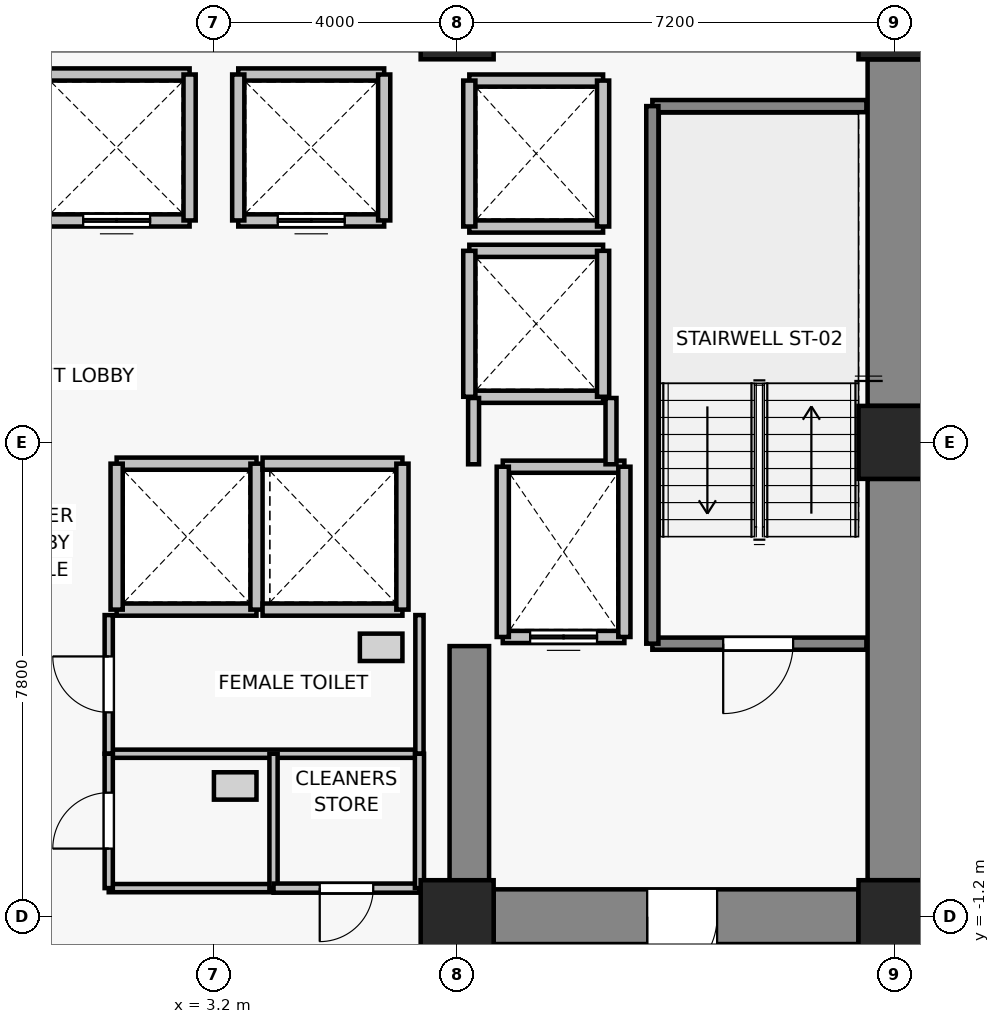
"""IFC4 building model, lengths in metres.
Left out: names, types, materials, properties, quantities, classifications, styles, units other than length and angle.
Written with IfcOpenShell. Run it as: python <this file> out.ifc"""

import sys

from ifc_helpers import new_model, si_unit, direction, frame, frame_2d, origin, origin_2d, place, context, subcontext, project, spatial, rectangle, extrude, source, transform, mapped, element, fill, save


model = new_model("IFC4")
c1 = context("Model", 3, precision=1e-05, world=origin(), true_north=direction((0.0, 1.0)))
c2 = subcontext(c1, "Body", "Model", "MODEL_VIEW")
j1 = project(units=[si_unit("LENGTHUNIT", "METRE"), si_unit("PLANEANGLEUNIT", "RADIAN")], contexts=[c1])
p1 = place(None, origin())
s1 = spatial("IfcSite", under=j1, at=p1, CompositionType="ELEMENT")
p2 = place(p1, origin())
s2 = spatial("IfcBuilding", under=s1, at=p2, CompositionType="ELEMENT")
p3 = place(p2, frame((0.0, 0.0, 53.8)))
s3 = spatial("IfcBuildingStorey", under=s2, at=p3, CompositionType="ELEMENT", Elevation=53.8)
for number, where, z_axis, x_axis in (
    (1, (7.2, -1.2, 0.0), (0.0, 0.0, 1.0), (1.0, 0.0, 0.0)),
    (2, (14.4, -1.2, 0.0), (0.0, 0.0, 1.0), (1.0, 0.0, 0.0)),
    (3, (14.4, 6.6, 0.0), (0.0, 0.0, 1.0), (1.0, 0.0, 0.0)),
    (4, (7.2, 13.5, 0.0), (0.0, 0.0, 1.0), (1.0, 0.0, 0.0)),
    (5, (14.4, 13.5, 0.0), (0.0, 0.0, 1.0), (1.0, 0.0, 0.0)),
):
    element("IfcColumn", number, at=place(p3, frame(where, z_axis=z_axis, x_axis=x_axis)), inside=s3, PredefinedType="COLUMN", context=c2, shape_type="SweptSolid", body=[
        extrude(rectangle(XDim=1.2, YDim=1.2, at=origin_2d()), origin(), (0.0, 0.0, 1.0), 3.3),
    ])
p4 = place(p3, frame((14.4, -0.6, 0.0), z_axis=(0.0, 0.0, 1.0), x_axis=(0.0, 1.0, 0.0)))
e6 = element("IfcWall", 6, at=p4, inside=s3, PredefinedType="SHEAR", context=c2, shape_type="SweptSolid", body=[
    extrude(rectangle(XDim=6.6, YDim=0.9, at=frame_2d((3.3, 0.0))), origin(), (0.0, 0.0, 1.0), 3.075),
])
p5 = place(p3, frame((14.4, 7.2, 0.0), z_axis=(0.0, 0.0, 1.0), x_axis=(0.0, 1.0, 0.0)))
e7 = element("IfcWall", 7, at=p5, inside=s3, PredefinedType="SHEAR", context=c2, shape_type="SweptSolid", body=[
    extrude(rectangle(XDim=5.7, YDim=0.9, at=frame_2d((2.85, 0.0))), origin(), (0.0, 0.0, 1.0), 3.075),
])
p6 = place(p3, frame((13.8, -1.2, 0.0), z_axis=(0.0, 0.0, 1.0), x_axis=(-1.0, 0.0, 0.0)))
e8 = element("IfcWall", 8, at=p6, inside=s3, PredefinedType="SHEAR", context=c2, shape_type="SweptSolid", body=[
    extrude(rectangle(XDim=6.0, YDim=0.9, at=frame_2d((3.0, 0.0))), origin(), (0.0, 0.0, 1.0), 3.075),
])
p7 = place(p6, frame((2.325, 0.0, 0.0)))
e9 = element("IfcOpeningElement", 9, at=p7, cuts=e8, PredefinedType="OPENING", context=c2, shape_type="SweptSolid", body=[
    extrude(rectangle(XDim=1.15, YDim=2.15, at=frame_2d((0.575, 1.075))), frame((0.0, 0.46, 0.0), z_axis=(0.0, -1.0, 0.0), x_axis=(1.0, 0.0, 0.0)), (0.0, 0.0, 1.0), 0.92),
])
p8 = place(p3, frame((7.4, -0.75, 0.0), z_axis=(0.0, 0.0, 1.0), x_axis=(0.0, 1.0, 0.0)))
e10 = element("IfcWall", 10, at=p8, inside=s3, PredefinedType="SHEAR", context=c2, shape_type="SweptSolid", body=[
    extrude(rectangle(XDim=4.0, YDim=0.65, at=frame_2d((2.0, 0.0))), origin(), (0.0, 0.0, 1.0), 3.075),
])
p9 = place(p3, frame((9.95, 3.4, 0.0), z_axis=(0.0, 0.0, 1.0), x_axis=(-1.0, 0.0, 0.0)))
e11 = element("IfcWall", 11, at=p9, inside=s3, PredefinedType="SOLIDWALL", context=c2, shape_type="SweptSolid", body=[
    extrude(rectangle(XDim=2.0, YDim=0.2, at=frame_2d((1.0, 0.0))), origin(), (0.0, 0.0, 1.0), 3.075),
])
p10 = place(p9, frame((0.45, 0.0, 0.0)))
e12 = element("IfcOpeningElement", 12, at=p10, cuts=e11, PredefinedType="OPENING", context=c2, shape_type="SweptSolid", body=[
    extrude(rectangle(XDim=1.1, YDim=2.2, at=frame_2d((0.55, 1.1))), frame((0.0, 0.11, 0.0), z_axis=(0.0, -1.0, 0.0), x_axis=(1.0, 0.0, 0.0)), (0.0, 0.0, 1.0), 0.22),
])
p11 = place(p3, frame((7.95, 6.2, 0.0), z_axis=(0.0, 0.0, 1.0), x_axis=(1.0, 0.0, 0.0)))
e13 = element("IfcWall", 13, at=p11, inside=s3, PredefinedType="SOLIDWALL", context=c2, shape_type="SweptSolid", body=[
    extrude(rectangle(XDim=2.0, YDim=0.2, at=frame_2d((1.0, 0.0))), origin(), (0.0, 0.0, 1.0), 3.075),
])
for number, where, z_axis, x_axis in (
    (14, (7.95, 3.4, 0.0), (0.0, 0.0, 1.0), (0.0, 1.0, 0.0)),
    (15, (9.95, 6.2, 0.0), (0.0, 0.0, 1.0), (0.0, -1.0, 0.0)),
):
    element("IfcWall", number, at=place(p3, frame(where, z_axis=z_axis, x_axis=x_axis)), inside=s3, PredefinedType="SOLIDWALL", context=c2, shape_type="SweptSolid", body=[
        extrude(rectangle(XDim=2.8, YDim=0.2, at=frame_2d((1.4, 0.0))), origin(), (0.0, 0.0, 1.0), 3.075),
    ])
p12 = place(p3, frame((2.8, 10.25, 0.0), z_axis=(0.0, 0.0, 1.0), x_axis=(-1.0, 0.0, 0.0)))
e16 = element("IfcWall", 16, at=p12, inside=s3, PredefinedType="SOLIDWALL", context=c2, shape_type="SweptSolid", body=[
    extrude(rectangle(XDim=2.4, YDim=0.2, at=frame_2d((1.2, 0.0))), origin(), (0.0, 0.0, 1.0), 3.075),
])
p13 = place(p12, frame((0.65, 0.0, 0.0)))
e17 = element("IfcOpeningElement", 17, at=p13, cuts=e16, PredefinedType="OPENING", context=c2, shape_type="SweptSolid", body=[
    extrude(rectangle(XDim=1.1, YDim=2.2, at=frame_2d((0.55, 1.1))), frame((0.0, 0.11, 0.0), z_axis=(0.0, -1.0, 0.0), x_axis=(1.0, 0.0, 0.0)), (0.0, 0.0, 1.0), 0.22),
])
p14 = place(p3, frame((0.4, 12.65, 0.0), z_axis=(0.0, 0.0, 1.0), x_axis=(1.0, 0.0, 0.0)))
e18 = element("IfcWall", 18, at=p14, inside=s3, PredefinedType="SOLIDWALL", context=c2, shape_type="SweptSolid", body=[
    extrude(rectangle(XDim=2.4, YDim=0.2, at=frame_2d((1.2, 0.0))), origin(), (0.0, 0.0, 1.0), 3.075),
])
p15 = place(p3, frame((2.8, 12.65, 0.0), z_axis=(0.0, 0.0, 1.0), x_axis=(0.0, -1.0, 0.0)))
e19 = element("IfcWall", 19, at=p15, inside=s3, PredefinedType="SOLIDWALL", context=c2, shape_type="SweptSolid", body=[
    extrude(rectangle(XDim=2.4, YDim=0.2, at=frame_2d((1.2, 0.0))), origin(), (0.0, 0.0, 1.0), 3.075),
])
p16 = place(p3, frame((6.0, 10.25, 0.0), z_axis=(0.0, 0.0, 1.0), x_axis=(-1.0, 0.0, 0.0)))
e20 = element("IfcWall", 20, at=p16, inside=s3, PredefinedType="SOLIDWALL", context=c2, shape_type="SweptSolid", body=[
    extrude(rectangle(XDim=2.4, YDim=0.2, at=frame_2d((1.2, 0.0))), origin(), (0.0, 0.0, 1.0), 3.075),
])
p17 = place(p16, frame((0.65, 0.0, 0.0)))
e21 = element("IfcOpeningElement", 21, at=p17, cuts=e20, PredefinedType="OPENING", context=c2, shape_type="SweptSolid", body=[
    extrude(rectangle(XDim=1.1, YDim=2.2, at=frame_2d((0.55, 1.1))), frame((0.0, 0.11, 0.0), z_axis=(0.0, -1.0, 0.0), x_axis=(1.0, 0.0, 0.0)), (0.0, 0.0, 1.0), 0.22),
])
for number, where, z_axis, x_axis in (
    (22, (3.6, 12.65, 0.0), (0.0, 0.0, 1.0), (1.0, 0.0, 0.0)),
    (23, (3.6, 10.25, 0.0), (0.0, 0.0, 1.0), (0.0, 1.0, 0.0)),
    (24, (6.0, 12.65, 0.0), (0.0, 0.0, 1.0), (0.0, -1.0, 0.0)),
):
    element("IfcWall", number, at=place(p3, frame(where, z_axis=z_axis, x_axis=x_axis)), inside=s3, PredefinedType="SOLIDWALL", context=c2, shape_type="SweptSolid", body=[
        extrude(rectangle(XDim=2.4, YDim=0.2, at=frame_2d((1.2, 0.0))), origin(), (0.0, 0.0, 1.0), 3.075),
    ])
for number, where, z_axis, x_axis in (
    (25, (3.9, 3.85, 0.0), (0.0, 0.0, 1.0), (-1.0, 0.0, 0.0)),
    (26, (1.6, 6.25, 0.0), (0.0, 0.0, 1.0), (1.0, 0.0, 0.0)),
):
    element("IfcWall", number, at=place(p3, frame(where, z_axis=z_axis, x_axis=x_axis)), inside=s3, PredefinedType="SOLIDWALL", context=c2, shape_type="SweptSolid", body=[
        extrude(rectangle(XDim=2.3, YDim=0.2, at=frame_2d((1.15, 0.0))), origin(), (0.0, 0.0, 1.0), 3.075),
    ])
for number, where, z_axis, x_axis in (
    (27, (1.6, 3.85, 0.0), (0.0, 0.0, 1.0), (0.0, 1.0, 0.0)),
    (28, (3.9, 6.25, 0.0), (0.0, 0.0, 1.0), (0.0, -1.0, 0.0)),
):
    element("IfcWall", number, at=place(p3, frame(where, z_axis=z_axis, x_axis=x_axis)), inside=s3, PredefinedType="SOLIDWALL", context=c2, shape_type="SweptSolid", body=[
        extrude(rectangle(XDim=2.4, YDim=0.2, at=frame_2d((1.2, 0.0))), origin(), (0.0, 0.0, 1.0), 3.075),
    ])
for number, where, z_axis, x_axis in (
    (29, (6.3, 3.85, 0.0), (0.0, 0.0, 1.0), (-1.0, 0.0, 0.0)),
    (30, (4.0, 6.25, 0.0), (0.0, 0.0, 1.0), (1.0, 0.0, 0.0)),
):
    element("IfcWall", number, at=place(p3, frame(where, z_axis=z_axis, x_axis=x_axis)), inside=s3, PredefinedType="SOLIDWALL", context=c2, shape_type="SweptSolid", body=[
        extrude(rectangle(XDim=2.3, YDim=0.2, at=frame_2d((1.15, 0.0))), origin(), (0.0, 0.0, 1.0), 3.075),
    ])
p18 = place(p3, frame((6.3, 6.25, 0.0), z_axis=(0.0, 0.0, 1.0), x_axis=(0.0, -1.0, 0.0)))
e31 = element("IfcWall", 31, at=p18, inside=s3, PredefinedType="SOLIDWALL", context=c2, shape_type="SweptSolid", body=[
    extrude(rectangle(XDim=2.4, YDim=0.2, at=frame_2d((1.2, 0.0))), origin(), (0.0, 0.0, 1.0), 3.075),
])
for number, where, z_axis, x_axis in (
    (32, (9.6, 7.35, 0.0), (0.0, 0.0, 1.0), (-1.0, 0.0, 0.0)),
    (33, (7.4, 9.75, 0.0), (0.0, 0.0, 1.0), (1.0, 0.0, 0.0)),
):
    element("IfcWall", number, at=place(p3, frame(where, z_axis=z_axis, x_axis=x_axis)), inside=s3, PredefinedType="SOLIDWALL", context=c2, shape_type="SweptSolid", body=[
        extrude(rectangle(XDim=2.2, YDim=0.2, at=frame_2d((1.1, 0.0))), origin(), (0.0, 0.0, 1.0), 2.465),
    ])
p19 = place(p3, frame((7.4, 7.35, 0.0), z_axis=(0.0, 0.0, 1.0), x_axis=(0.0, 1.0, 0.0)))
e34 = element("IfcWall", 34, at=p19, inside=s3, PredefinedType="SOLIDWALL", context=c2, shape_type="SweptSolid", body=[
    extrude(rectangle(XDim=2.4, YDim=0.2, at=frame_2d((1.2, 0.0))), origin(), (0.0, 0.0, 1.0), 2.465),
])
p20 = place(p3, frame((9.6, 9.75, 0.0), z_axis=(0.0, 0.0, 1.0), x_axis=(0.0, -1.0, 0.0)))
e35 = element("IfcWall", 35, at=p20, inside=s3, PredefinedType="SOLIDWALL", context=c2, shape_type="SweptSolid", body=[
    extrude(rectangle(XDim=2.4, YDim=0.2, at=frame_2d((1.2, 0.0))), origin(), (0.0, 0.0, 1.0), 3.075),
])
for number, where, z_axis, x_axis in (
    (36, (9.6, 10.15, 0.0), (0.0, 0.0, 1.0), (-1.0, 0.0, 0.0)),
    (37, (7.4, 12.55, 0.0), (0.0, 0.0, 1.0), (1.0, 0.0, 0.0)),
):
    element("IfcWall", number, at=place(p3, frame(where, z_axis=z_axis, x_axis=x_axis)), inside=s3, PredefinedType="SOLIDWALL", context=c2, shape_type="SweptSolid", body=[
        extrude(rectangle(XDim=2.2, YDim=0.2, at=frame_2d((1.1, 0.0))), origin(), (0.0, 0.0, 1.0), 2.465),
    ])
p21 = place(p3, frame((7.4, 10.15, 0.0), z_axis=(0.0, 0.0, 1.0), x_axis=(0.0, 1.0, 0.0)))
e38 = element("IfcWall", 38, at=p21, inside=s3, PredefinedType="SOLIDWALL", context=c2, shape_type="SweptSolid", body=[
    extrude(rectangle(XDim=2.4, YDim=0.2, at=frame_2d((1.2, 0.0))), origin(), (0.0, 0.0, 1.0), 2.465),
])
p22 = place(p3, frame((9.6, 12.55, 0.0), z_axis=(0.0, 0.0, 1.0), x_axis=(0.0, -1.0, 0.0)))
e39 = element("IfcWall", 39, at=p22, inside=s3, PredefinedType="SOLIDWALL", context=c2, shape_type="SweptSolid", body=[
    extrude(rectangle(XDim=2.4, YDim=0.2, at=frame_2d((1.2, 0.0))), origin(), (0.0, 0.0, 1.0), 3.075),
])
p23 = place(p3, frame((13.93, 3.29, 0.0), z_axis=(0.0, 0.0, 1.0), x_axis=(-1.0, 0.0, 0.0)))
e40 = element("IfcWall", 40, at=p23, inside=s3, PredefinedType="SOLIDWALL", context=c2, shape_type="SweptSolid", body=[
    extrude(rectangle(XDim=3.52, YDim=0.2, at=frame_2d((1.76, 0.0))), origin(), (0.0, 0.0, 1.0), 3.075),
])
p24 = place(p23, frame((1.205, 0.0, 0.0)))
e41 = element("IfcOpeningElement", 41, at=p24, cuts=e40, PredefinedType="OPENING", context=c2, shape_type="SweptSolid", body=[
    extrude(rectangle(XDim=1.15, YDim=2.15, at=frame_2d((0.575, 1.075))), frame((0.0, 0.11, 0.0), z_axis=(0.0, -1.0, 0.0), x_axis=(1.0, 0.0, 0.0)), (0.0, 0.0, 1.0), 0.22),
])
p25 = place(p3, frame((10.41, 12.13, 0.0), z_axis=(0.0, 0.0, 1.0), x_axis=(1.0, 0.0, 0.0)))
e42 = element("IfcWall", 42, at=p25, inside=s3, PredefinedType="SOLIDWALL", context=c2, shape_type="SweptSolid", body=[
    extrude(rectangle(XDim=3.52, YDim=0.2, at=frame_2d((1.76, 0.0))), origin(), (0.0, 0.0, 1.0), 3.075),
])
p26 = place(p3, frame((10.41, 3.29, 0.0), z_axis=(0.0, 0.0, 1.0), x_axis=(0.0, 1.0, 0.0)))
e43 = element("IfcWall", 43, at=p26, inside=s3, PredefinedType="SOLIDWALL", context=c2, shape_type="SweptSolid", body=[
    extrude(rectangle(XDim=8.84, YDim=0.2, at=frame_2d((4.42, 0.0))), origin(), (0.0, 0.0, 1.0), 3.075),
])
p27 = place(p3, frame((7.47, 6.24, 0.0), z_axis=(0.0, 0.0, 1.0), x_axis=(0.0, 1.0, 0.0)))
e44 = element("IfcWall", 44, at=p27, inside=s3, PredefinedType="PARTITIONING", context=c2, shape_type="SweptSolid", body=[
    extrude(rectangle(XDim=1.09, YDim=0.18, at=frame_2d((0.545, 0.0))), origin(), (0.0, 0.0, 1.0), 2.465),
])
p28 = place(p3, frame((9.73, 7.33, 0.0), z_axis=(0.0, 0.0, 1.0), x_axis=(0.0, -1.0, 0.0)))
e45 = element("IfcWall", 45, at=p28, inside=s3, PredefinedType="PARTITIONING", context=c2, shape_type="SweptSolid", body=[
    extrude(rectangle(XDim=1.09, YDim=0.18, at=frame_2d((0.545, 0.0))), origin(), (0.0, 0.0, 1.0), 3.075),
])
p29 = place(p3, frame((6.58, 1.48, 0.0), z_axis=(0.0, 0.0, 1.0), x_axis=(-1.0, 0.0, 0.0)))
e46 = element("IfcWall", 46, at=p29, inside=s3, PredefinedType="PARTITIONING", context=c2, shape_type="SweptSolid", body=[
    extrude(rectangle(XDim=5.11, YDim=0.135, at=frame_2d((2.555, 0.0))), origin(), (0.0, 0.0, 1.0), 3.075),
])
p30 = place(p3, frame((1.47, 1.48, 0.0), z_axis=(0.0, 0.0, 1.0), x_axis=(0.0, 1.0, 0.0)))
e47 = element("IfcWall", 47, at=p30, inside=s3, PredefinedType="PARTITIONING", context=c2, shape_type="SweptSolid", body=[
    extrude(rectangle(XDim=2.28, YDim=0.135, at=frame_2d((1.14, 0.0))), origin(), (0.0, 0.0, 1.0), 3.075),
])
p31 = place(p30, frame((0.68, 0.0, 0.0)))
e48 = element("IfcOpeningElement", 48, at=p31, cuts=e47, PredefinedType="OPENING", context=c2, shape_type="SweptSolid", body=[
    extrude(rectangle(XDim=0.92, YDim=2.1, at=frame_2d((0.46, 1.05))), frame((0.0, 0.077, 0.0), z_axis=(0.0, -1.0, 0.0), x_axis=(1.0, 0.0, 0.0)), (0.0, 0.0, 1.0), 0.155),
])
p32 = place(p3, frame((6.58, 3.76, 0.0), z_axis=(0.0, 0.0, 1.0), x_axis=(0.0, -1.0, 0.0)))
e49 = element("IfcWall", 49, at=p32, inside=s3, PredefinedType="PARTITIONING", context=c2, shape_type="SweptSolid", body=[
    extrude(rectangle(XDim=2.28, YDim=0.135, at=frame_2d((1.14, 0.0))), origin(), (0.0, 0.0, 1.0), 3.075),
])
p33 = place(p3, frame((4.18, -0.73, 0.0), z_axis=(0.0, 0.0, 1.0), x_axis=(-1.0, 0.0, 0.0)))
e50 = element("IfcWall", 50, at=p33, inside=s3, PredefinedType="PARTITIONING", context=c2, shape_type="SweptSolid", body=[
    extrude(rectangle(XDim=2.71, YDim=0.135, at=frame_2d((1.355, 0.0))), origin(), (0.0, 0.0, 1.0), 3.075),
])
p34 = place(p3, frame((1.47, -0.73, 0.0), z_axis=(0.0, 0.0, 1.0), x_axis=(0.0, 1.0, 0.0)))
e51 = element("IfcWall", 51, at=p34, inside=s3, PredefinedType="PARTITIONING", context=c2, shape_type="SweptSolid", body=[
    extrude(rectangle(XDim=2.21, YDim=0.135, at=frame_2d((1.105, 0.0))), origin(), (0.0, 0.0, 1.0), 3.075),
])
p35 = place(p34, frame((0.65, 0.0, 0.0)))
e52 = element("IfcOpeningElement", 52, at=p35, cuts=e51, PredefinedType="OPENING", context=c2, shape_type="SweptSolid", body=[
    extrude(rectangle(XDim=0.92, YDim=2.1, at=frame_2d((0.46, 1.05))), frame((0.0, 0.077, 0.0), z_axis=(0.0, -1.0, 0.0), x_axis=(1.0, 0.0, 0.0)), (0.0, 0.0, 1.0), 0.155),
])
p36 = place(p3, frame((4.18, 1.48, 0.0), z_axis=(0.0, 0.0, 1.0), x_axis=(0.0, -1.0, 0.0)))
e53 = element("IfcWall", 53, at=p36, inside=s3, PredefinedType="PARTITIONING", context=c2, shape_type="SweptSolid", body=[
    extrude(rectangle(XDim=2.21, YDim=0.135, at=frame_2d((1.105, 0.0))), origin(), (0.0, 0.0, 1.0), 3.075),
])
p37 = place(p3, frame((6.58, -0.73, 0.0), z_axis=(0.0, 0.0, 1.0), x_axis=(-1.0, 0.0, 0.0)))
e54 = element("IfcWall", 54, at=p37, inside=s3, PredefinedType="PARTITIONING", context=c2, shape_type="SweptSolid", body=[
    extrude(rectangle(XDim=2.4, YDim=0.15, at=frame_2d((1.2, 0.0))), origin(), (0.0, 0.0, 1.0), 3.075),
])
p38 = place(p37, frame((0.76, 0.0, 0.0)))
e55 = element("IfcOpeningElement", 55, at=p38, cuts=e54, PredefinedType="OPENING", context=c2, shape_type="SweptSolid", body=[
    extrude(rectangle(XDim=0.88, YDim=2.1, at=frame_2d((0.44, 1.05))), frame((0.0, 0.085, 0.0), z_axis=(0.0, -1.0, 0.0), x_axis=(1.0, 0.0, 0.0)), (0.0, 0.0, 1.0), 0.17),
])
p39 = place(p3, frame((6.58, 1.48, 0.0), z_axis=(0.0, 0.0, 1.0), x_axis=(0.0, -1.0, 0.0)))
e56 = element("IfcWall", 56, at=p39, inside=s3, PredefinedType="PARTITIONING", context=c2, shape_type="SweptSolid", body=[
    extrude(rectangle(XDim=2.21, YDim=0.15, at=frame_2d((1.105, 0.0))), origin(), (0.0, 0.0, 1.0), 3.075),
])
m1 = source(origin(), c2, "Body", "SweptSolid", [
    extrude(rectangle(XDim=1.1, YDim=2.2, at=frame_2d((0.55, 1.1))), frame((0.0, 0.025, 0.0), z_axis=(0.0, -1.0, 0.0), x_axis=(1.0, 0.0, 0.0)), (0.0, 0.0, 1.0), 0.05),
])
p40 = place(p10, origin())
e57 = element("IfcDoor", 57, at=p40, inside=s3, OperationType="DOUBLE_DOOR_SLIDING", PredefinedType="DOOR", context=c2, shape_type="MappedRepresentation", body=[
    mapped(m1, transform((0.0, 0.0, 0.0), x_axis=(1.0, 0.0, 0.0), y_axis=(0.0, 1.0, 0.0), z_axis=(0.0, 0.0, 1.0), scale=1.0)),
])
fill(e12, e57)
p41 = place(p13, origin())
e58 = element("IfcDoor", 58, at=p41, inside=s3, OperationType="DOUBLE_DOOR_SLIDING", PredefinedType="DOOR", context=c2, shape_type="MappedRepresentation", body=[
    mapped(m1, transform((0.0, 0.0, 0.0), x_axis=(1.0, 0.0, 0.0), y_axis=(0.0, 1.0, 0.0), z_axis=(0.0, 0.0, 1.0), scale=1.0)),
])
fill(e17, e58)
p42 = place(p17, origin())
e59 = element("IfcDoor", 59, at=p42, inside=s3, OperationType="DOUBLE_DOOR_SLIDING", PredefinedType="DOOR", context=c2, shape_type="MappedRepresentation", body=[
    mapped(m1, transform((0.0, 0.0, 0.0), x_axis=(1.0, 0.0, 0.0), y_axis=(0.0, 1.0, 0.0), z_axis=(0.0, 0.0, 1.0), scale=1.0)),
])
fill(e21, e59)
m2 = source(origin(), c2, "Body", "SweptSolid", [
    extrude(rectangle(XDim=1.15, YDim=2.15, at=frame_2d((0.575, 1.075))), frame((0.0, 0.025, 0.0), z_axis=(0.0, -1.0, 0.0), x_axis=(1.0, 0.0, 0.0)), (0.0, 0.0, 1.0), 0.05),
])
p43 = place(p24, origin())
e60 = element("IfcDoor", 60, at=p43, inside=s3, OperationType="SINGLE_SWING_RIGHT", PredefinedType="DOOR", context=c2, shape_type="MappedRepresentation", body=[
    mapped(m2, transform((0.0, 0.0, 0.0), x_axis=(1.0, 0.0, 0.0), y_axis=(0.0, 1.0, 0.0), z_axis=(0.0, 0.0, 1.0), scale=1.0)),
])
fill(e41, e60)
p44 = place(p7, origin())
e61 = element("IfcDoor", 61, at=p44, inside=s3, OperationType="SINGLE_SWING_RIGHT", PredefinedType="DOOR", context=c2, shape_type="MappedRepresentation", body=[
    mapped(m2, transform((0.0, 0.0, 0.0), x_axis=(1.0, 0.0, 0.0), y_axis=(0.0, 1.0, 0.0), z_axis=(0.0, 0.0, 1.0), scale=1.0)),
])
fill(e9, e61)
m3 = source(origin(), c2, "Body", "SweptSolid", [
    extrude(rectangle(XDim=0.92, YDim=2.1, at=frame_2d((0.46, 1.05))), frame((0.0, 0.025, 0.0), z_axis=(0.0, -1.0, 0.0), x_axis=(1.0, 0.0, 0.0)), (0.0, 0.0, 1.0), 0.05),
])
p45 = place(p31, origin())
e62 = element("IfcDoor", 62, at=p45, inside=s3, OperationType="SINGLE_SWING_RIGHT", PredefinedType="DOOR", context=c2, shape_type="MappedRepresentation", body=[
    mapped(m3, transform((0.0, 0.0, 0.0), x_axis=(1.0, 0.0, 0.0), y_axis=(0.0, 1.0, 0.0), z_axis=(0.0, 0.0, 1.0), scale=1.0)),
])
fill(e48, e62)
p46 = place(p35, origin())
e63 = element("IfcDoor", 63, at=p46, inside=s3, OperationType="SINGLE_SWING_LEFT", PredefinedType="DOOR", context=c2, shape_type="MappedRepresentation", body=[
    mapped(m3, transform((0.0, 0.0, 0.0), x_axis=(1.0, 0.0, 0.0), y_axis=(0.0, 1.0, 0.0), z_axis=(0.0, 0.0, 1.0), scale=1.0)),
])
fill(e52, e63)
m4 = source(origin(), c2, "Body", "SweptSolid", [
    extrude(rectangle(XDim=0.88, YDim=2.1, at=frame_2d((0.44, 1.05))), frame((0.0, 0.025, 0.0), z_axis=(0.0, -1.0, 0.0), x_axis=(1.0, 0.0, 0.0)), (0.0, 0.0, 1.0), 0.05),
])
p47 = place(p38, origin())
e64 = element("IfcDoor", 64, at=p47, inside=s3, OperationType="SINGLE_SWING_RIGHT", PredefinedType="DOOR", context=c2, shape_type="MappedRepresentation", body=[
    mapped(m4, transform((0.0, 0.0, 0.0), x_axis=(1.0, 0.0, 0.0), y_axis=(0.0, 1.0, 0.0), z_axis=(0.0, 0.0, 1.0), scale=1.0)),
])
fill(e55, e64)
save(model, sys.argv[1])
